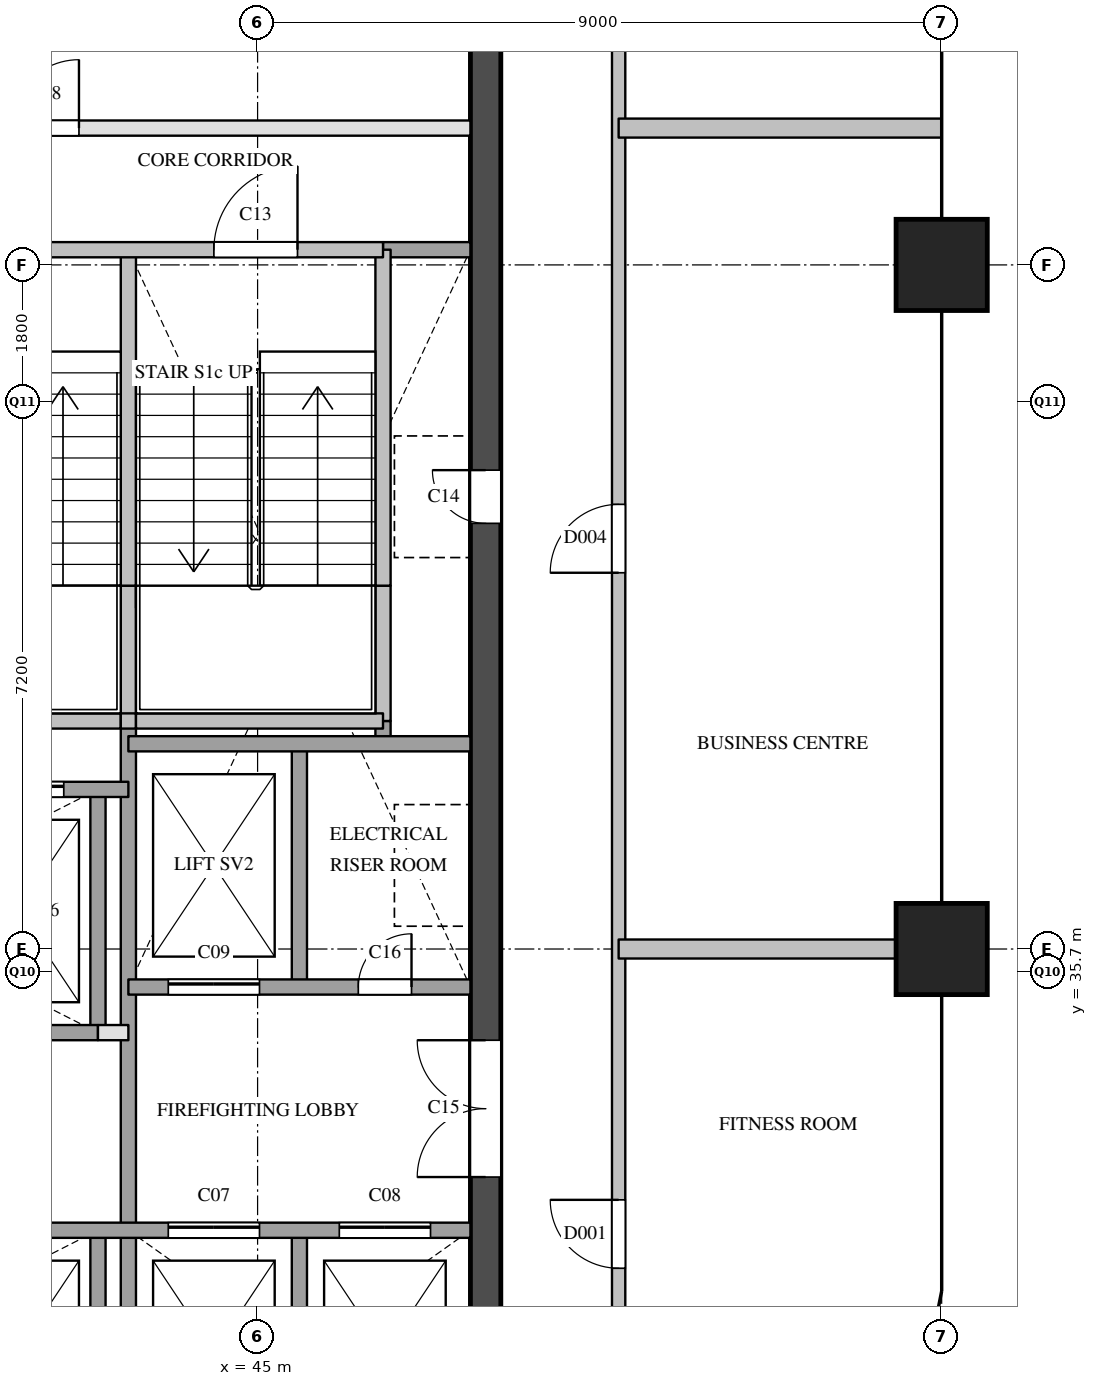
"""IFC4 building model, lengths in metres.
Left out: names, types, materials, properties, quantities, classifications, styles, units other than length and angle.
Written with IfcOpenShell. Run it as: python <this file> out.ifc"""

import sys

from ifc_helpers import new_model, si_unit, direction, frame, frame_2d, origin, origin_2d, place, context, subcontext, project, spatial, rectangle, extrude, element, fill, save


model = new_model("IFC4")
c1 = context("Model", 3, precision=1e-05, world=origin(), true_north=direction((0.0, 1.0)))
c2 = subcontext(c1, "Body", "Model", "MODEL_VIEW")
j1 = project(units=[si_unit("LENGTHUNIT", "METRE"), si_unit("PLANEANGLEUNIT", "RADIAN")], contexts=[c1])
p1 = place(None, origin())
s1 = spatial("IfcSite", under=j1, at=p1, CompositionType="ELEMENT")
p2 = place(p1, origin())
s2 = spatial("IfcBuilding", under=s1, at=p2, CompositionType="ELEMENT")
p3 = place(p2, frame((0.0, 0.0, 281.3)))
s3 = spatial("IfcBuildingStorey", under=s2, at=p3, CompositionType="ELEMENT", Elevation=281.3)
for number, where, z_axis, x_axis in (
    (1, (54.0, 36.0, 0.0), (0.0, 0.0, 1.0), (1.0, 0.0, 0.0)),
    (2, (54.0, 45.0, 0.0), (0.0, 0.0, 1.0), (1.0, 0.0, 0.0)),
):
    element("IfcColumn", number, at=place(p3, frame(where, z_axis=z_axis, x_axis=x_axis)), inside=s3, PredefinedType="COLUMN", context=c2, shape_type="SweptSolid", body=[
        extrude(rectangle(XDim=1.2, YDim=1.2, at=origin_2d()), origin(), (0.0, 0.0, 1.0), 3.9),
    ])
p4 = place(p3, frame((48.0, 29.1, 0.0), z_axis=(0.0, 0.0, 1.0), x_axis=(0.0, 1.0, 0.0)))
e3 = element("IfcWall", 3, at=p4, inside=s3, PredefinedType="SHEAR", context=c2, shape_type="SweptSolid", body=[
    extrude(rectangle(XDim=20.3, YDim=0.4, at=frame_2d((10.15, 0.0))), origin(), (0.0, 0.0, 1.0), 3.6),
])
p5 = place(p4, frame((12.5, 0.0, 0.0)))
e4 = element("IfcOpeningElement", 4, at=p5, cuts=e3, PredefinedType="OPENING", context=c2, shape_type="SweptSolid", body=[
    extrude(rectangle(XDim=0.7, YDim=2.1, at=frame_2d((0.35, 1.05))), frame((0.0, 0.21, 0.0), z_axis=(0.0, -1.0, 0.0), x_axis=(1.0, 0.0, 0.0)), (0.0, 0.0, 1.0), 0.42),
])
p6 = place(p4, frame((3.9, 0.0, 0.0)))
e5 = element("IfcOpeningElement", 5, at=p6, cuts=e3, PredefinedType="OPENING", context=c2, shape_type="SweptSolid", body=[
    extrude(rectangle(XDim=1.8, YDim=2.1, at=frame_2d((0.9, 1.05))), frame((0.0, 0.21, 0.0), z_axis=(0.0, -1.0, 0.0), x_axis=(1.0, 0.0, 0.0)), (0.0, 0.0, 1.0), 0.42),
])
p7 = place(p3, frame((42.9, 29.1, 0.0), z_axis=(0.0, 0.0, 1.0), x_axis=(0.0, 1.0, 0.0)))
e6 = element("IfcWall", 6, at=p7, inside=s3, PredefinedType="SOLIDWALL", context=c2, shape_type="SweptSolid", body=[
    extrude(rectangle(XDim=3.2, YDim=0.2, at=frame_2d((1.6, 0.0))), origin(), (0.0, 0.0, 1.0), 3.6),
])
p8 = place(p3, frame((42.9, 34.9, 0.0), z_axis=(0.0, 0.0, 1.0), x_axis=(0.0, 1.0, 0.0)))
e7 = element("IfcWall", 7, at=p8, inside=s3, PredefinedType="SOLIDWALL", context=c2, shape_type="SweptSolid", body=[
    extrude(rectangle(XDim=3.2, YDim=0.2, at=frame_2d((1.6, 0.0))), origin(), (0.0, 0.0, 1.0), 3.6),
])
p9 = place(p3, frame((43.3, 29.1, 0.0), z_axis=(0.0, 0.0, 1.0), x_axis=(0.0, 1.0, 0.0)))
e8 = element("IfcWall", 8, at=p9, inside=s3, PredefinedType="SOLIDWALL", context=c2, shape_type="SweptSolid", body=[
    extrude(rectangle(XDim=9.9, YDim=0.2, at=frame_2d((4.95, 0.0))), origin(), (0.0, 0.0, 1.0), 3.6),
])
p10 = place(p3, frame((43.3, 39.0, 0.0), z_axis=(0.0, 0.0, 1.0), x_axis=(0.0, 1.0, 0.0)))
e9 = element("IfcWall", 9, at=p10, inside=s3, PredefinedType="SOLIDWALL", context=c2, shape_type="SweptSolid", body=[
    extrude(rectangle(XDim=1.78, YDim=0.2, at=frame_2d((0.89, 0.0))), origin(), (0.0, 0.0, 1.0), 3.6),
])
p11 = place(p3, frame((43.3, 40.78, 0.0), z_axis=(0.0, 0.0, 1.0), x_axis=(0.0, 1.0, 0.0)))
e10 = element("IfcWall", 10, at=p11, inside=s3, PredefinedType="SOLIDWALL", context=c2, shape_type="SweptSolid", body=[
    extrude(rectangle(XDim=4.42, YDim=0.2, at=frame_2d((2.21, 0.0))), origin(), (0.0, 0.0, 1.0), 3.6),
])
for number, where, z_axis, x_axis in (
    (11, (45.55, 29.1, 0.0), (0.0, 0.0, 1.0), (0.0, 1.0, 0.0)),
    (12, (45.55, 35.5, 0.0), (0.0, 0.0, 1.0), (0.0, 1.0, 0.0)),
):
    element("IfcWall", number, at=place(p3, frame(where, z_axis=z_axis, x_axis=x_axis)), inside=s3, PredefinedType="SOLIDWALL", context=c2, shape_type="SweptSolid", body=[
        extrude(rectangle(XDim=3.2, YDim=0.2, at=frame_2d((1.6, 0.0))), origin(), (0.0, 0.0, 1.0), 3.6),
    ])
p12 = place(p3, frame((46.65, 38.7, 0.0), z_axis=(0.0, 0.0, 1.0), x_axis=(0.0, 1.0, 0.0)))
e13 = element("IfcWall", 13, at=p12, inside=s3, PredefinedType="SOLIDWALL", context=c2, shape_type="SweptSolid", body=[
    extrude(rectangle(XDim=0.3, YDim=0.2, at=frame_2d((0.15, 0.0))), origin(), (0.0, 0.0, 1.0), 3.6),
])
p13 = place(p3, frame((46.65, 39.0, 0.0), z_axis=(0.0, 0.0, 1.0), x_axis=(0.0, 1.0, 0.0)))
e14 = element("IfcWall", 14, at=p13, inside=s3, PredefinedType="SOLIDWALL", context=c2, shape_type="SweptSolid", body=[
    extrude(rectangle(XDim=1.78, YDim=0.2, at=frame_2d((0.89, 0.0))), origin(), (0.0, 0.0, 1.0), 3.6),
])
p14 = place(p3, frame((46.65, 40.78, 0.0), z_axis=(0.0, 0.0, 1.0), x_axis=(0.0, 1.0, 0.0)))
e15 = element("IfcWall", 15, at=p14, inside=s3, PredefinedType="SOLIDWALL", context=c2, shape_type="SweptSolid", body=[
    extrude(rectangle(XDim=4.42, YDim=0.2, at=frame_2d((2.21, 0.0))), origin(), (0.0, 0.0, 1.0), 3.6),
])
p15 = place(p3, frame((36.6, 32.3, 0.0), z_axis=(0.0, 0.0, 1.0), x_axis=(1.0, 0.0, 0.0)))
e16 = element("IfcWall", 16, at=p15, inside=s3, PredefinedType="SOLIDWALL", context=c2, shape_type="SweptSolid", body=[
    extrude(rectangle(XDim=11.2, YDim=0.2, at=frame_2d((5.6, 0.0))), origin(), (0.0, 0.0, 1.0), 3.6),
])
p16 = place(p15, frame((7.225, 0.0, 0.0)))
e17 = element("IfcOpeningElement", 17, at=p16, cuts=e16, PredefinedType="OPENING", context=c2, shape_type="SweptSolid", body=[
    extrude(rectangle(XDim=1.2, YDim=2.1, at=frame_2d((0.6, 1.05))), frame((0.0, 0.11, 0.0), z_axis=(0.0, -1.0, 0.0), x_axis=(1.0, 0.0, 0.0)), (0.0, 0.0, 1.0), 0.22),
])
p17 = place(p15, frame((9.475, 0.0, 0.0)))
e18 = element("IfcOpeningElement", 18, at=p17, cuts=e16, PredefinedType="OPENING", context=c2, shape_type="SweptSolid", body=[
    extrude(rectangle(XDim=1.2, YDim=2.1, at=frame_2d((0.6, 1.05))), frame((0.0, 0.11, 0.0), z_axis=(0.0, -1.0, 0.0), x_axis=(1.0, 0.0, 0.0)), (0.0, 0.0, 1.0), 0.22),
])
p18 = place(p3, frame((42.9, 34.9, 0.0), z_axis=(0.0, 0.0, 1.0), x_axis=(1.0, 0.0, 0.0)))
e19 = element("IfcWall", 19, at=p18, inside=s3, PredefinedType="PARTITIONING", context=c2, shape_type="SweptSolid", body=[
    extrude(rectangle(XDim=0.4, YDim=0.2, at=frame_2d((0.2, 0.0))), origin(), (0.0, 0.0, 1.0), 3.6),
])
p19 = place(p3, frame((36.6, 34.9, 0.0), z_axis=(0.0, 0.0, 1.0), x_axis=(1.0, 0.0, 0.0)))
e20 = element("IfcWall", 20, at=p19, inside=s3, PredefinedType="SOLIDWALL", context=c2, shape_type="SweptSolid", body=[
    extrude(rectangle(XDim=6.3, YDim=0.2, at=frame_2d((3.15, 0.0))), origin(), (0.0, 0.0, 1.0), 3.6),
])
p20 = place(p3, frame((43.3, 35.5, 0.0), z_axis=(0.0, 0.0, 1.0), x_axis=(1.0, 0.0, 0.0)))
e21 = element("IfcWall", 21, at=p20, inside=s3, PredefinedType="SOLIDWALL", context=c2, shape_type="SweptSolid", body=[
    extrude(rectangle(XDim=4.5, YDim=0.2, at=frame_2d((2.25, 0.0))), origin(), (0.0, 0.0, 1.0), 3.6),
])
p21 = place(p20, frame((0.525, 0.0, 0.0)))
e22 = element("IfcOpeningElement", 22, at=p21, cuts=e21, PredefinedType="OPENING", context=c2, shape_type="SweptSolid", body=[
    extrude(rectangle(XDim=1.2, YDim=2.1, at=frame_2d((0.6, 1.05))), frame((0.0, 0.11, 0.0), z_axis=(0.0, -1.0, 0.0), x_axis=(1.0, 0.0, 0.0)), (0.0, 0.0, 1.0), 0.22),
])
p22 = place(p20, frame((3.025, 0.0, 0.0)))
e23 = element("IfcOpeningElement", 23, at=p22, cuts=e21, PredefinedType="OPENING", context=c2, shape_type="SweptSolid", body=[
    extrude(rectangle(XDim=0.7, YDim=2.1, at=frame_2d((0.35, 1.05))), frame((0.0, 0.11, 0.0), z_axis=(0.0, -1.0, 0.0), x_axis=(1.0, 0.0, 0.0)), (0.0, 0.0, 1.0), 0.22),
])
p23 = place(p3, frame((36.6, 38.1, 0.0), z_axis=(0.0, 0.0, 1.0), x_axis=(1.0, 0.0, 0.0)))
e24 = element("IfcWall", 24, at=p23, inside=s3, PredefinedType="SOLIDWALL", context=c2, shape_type="SweptSolid", body=[
    extrude(rectangle(XDim=6.7, YDim=0.2, at=frame_2d((3.35, 0.0))), origin(), (0.0, 0.0, 1.0), 3.6),
])
p24 = place(p23, frame((0.45, 0.0, 0.0)))
e25 = element("IfcOpeningElement", 25, at=p24, cuts=e24, PredefinedType="OPENING", context=c2, shape_type="SweptSolid", body=[
    extrude(rectangle(XDim=1.2, YDim=2.1, at=frame_2d((0.6, 1.05))), frame((0.0, 0.11, 0.0), z_axis=(0.0, -1.0, 0.0), x_axis=(1.0, 0.0, 0.0)), (0.0, 0.0, 1.0), 0.22),
])
p25 = place(p23, frame((2.55, 0.0, 0.0)))
e26 = element("IfcOpeningElement", 26, at=p25, cuts=e24, PredefinedType="OPENING", context=c2, shape_type="SweptSolid", body=[
    extrude(rectangle(XDim=1.2, YDim=2.1, at=frame_2d((0.6, 1.05))), frame((0.0, 0.11, 0.0), z_axis=(0.0, -1.0, 0.0), x_axis=(1.0, 0.0, 0.0)), (0.0, 0.0, 1.0), 0.22),
])
p26 = place(p23, frame((4.65, 0.0, 0.0)))
e27 = element("IfcOpeningElement", 27, at=p26, cuts=e24, PredefinedType="OPENING", context=c2, shape_type="SweptSolid", body=[
    extrude(rectangle(XDim=1.2, YDim=2.1, at=frame_2d((0.6, 1.05))), frame((0.0, 0.11, 0.0), z_axis=(0.0, -1.0, 0.0), x_axis=(1.0, 0.0, 0.0)), (0.0, 0.0, 1.0), 0.22),
])
p27 = place(p3, frame((43.3, 38.7, 0.0), z_axis=(0.0, 0.0, 1.0), x_axis=(1.0, 0.0, 0.0)))
e28 = element("IfcWall", 28, at=p27, inside=s3, PredefinedType="SOLIDWALL", context=c2, shape_type="SweptSolid", body=[
    extrude(rectangle(XDim=4.5, YDim=0.2, at=frame_2d((2.25, 0.0))), origin(), (0.0, 0.0, 1.0), 3.6),
])
p28 = place(p3, frame((40.05, 39.0, 0.0), z_axis=(0.0, 0.0, 1.0), x_axis=(1.0, 0.0, 0.0)))
e29 = element("IfcWall", 29, at=p28, inside=s3, PredefinedType="SOLIDWALL", context=c2, shape_type="SweptSolid", body=[
    extrude(rectangle(XDim=3.15, YDim=0.2, at=frame_2d((1.575, 0.0))), origin(), (0.0, 0.0, 1.0), 3.6),
])
p29 = place(p3, frame((43.2, 39.0, 0.0), z_axis=(0.0, 0.0, 1.0), x_axis=(1.0, 0.0, 0.0)))
e30 = element("IfcWall", 30, at=p29, inside=s3, PredefinedType="SOLIDWALL", context=c2, shape_type="SweptSolid", body=[
    extrude(rectangle(XDim=0.2, YDim=0.2, at=frame_2d((0.1, 0.0))), origin(), (0.0, 0.0, 1.0), 3.6),
])
p30 = place(p3, frame((43.4, 39.0, 0.0), z_axis=(0.0, 0.0, 1.0), x_axis=(1.0, 0.0, 0.0)))
e31 = element("IfcWall", 31, at=p30, inside=s3, PredefinedType="SOLIDWALL", context=c2, shape_type="SweptSolid", body=[
    extrude(rectangle(XDim=3.25, YDim=0.2, at=frame_2d((1.625, 0.0))), origin(), (0.0, 0.0, 1.0), 3.6),
])
p31 = place(p3, frame((46.65, 45.2, 0.0), z_axis=(0.0, 0.0, 1.0), x_axis=(1.0, 0.0, 0.0)))
e32 = element("IfcWall", 32, at=p31, inside=s3, PredefinedType="SOLIDWALL", context=c2, shape_type="SweptSolid", body=[
    extrude(rectangle(XDim=1.15, YDim=0.2, at=frame_2d((0.575, 0.0))), origin(), (0.0, 0.0, 1.0), 3.6),
])
p32 = place(p3, frame((36.6, 45.2, 0.0), z_axis=(0.0, 0.0, 1.0), x_axis=(1.0, 0.0, 0.0)))
e33 = element("IfcWall", 33, at=p32, inside=s3, PredefinedType="SOLIDWALL", context=c2, shape_type="SweptSolid", body=[
    extrude(rectangle(XDim=10.05, YDim=0.2, at=frame_2d((5.025, 0.0))), origin(), (0.0, 0.0, 1.0), 3.6),
])
p33 = place(p32, frame((1.125, 0.0, 0.0)))
e34 = element("IfcOpeningElement", 34, at=p33, cuts=e33, PredefinedType="OPENING", context=c2, shape_type="SweptSolid", body=[
    extrude(rectangle(XDim=1.1, YDim=2.1, at=frame_2d((0.55, 1.05))), frame((0.0, 0.11, 0.0), z_axis=(0.0, -1.0, 0.0), x_axis=(1.0, 0.0, 0.0)), (0.0, 0.0, 1.0), 0.22),
])
p34 = place(p32, frame((4.475, 0.0, 0.0)))
e35 = element("IfcOpeningElement", 35, at=p34, cuts=e33, PredefinedType="OPENING", context=c2, shape_type="SweptSolid", body=[
    extrude(rectangle(XDim=1.1, YDim=2.1, at=frame_2d((0.55, 1.05))), frame((0.0, 0.11, 0.0), z_axis=(0.0, -1.0, 0.0), x_axis=(1.0, 0.0, 0.0)), (0.0, 0.0, 1.0), 0.22),
])
p35 = place(p32, frame((7.825, 0.0, 0.0)))
e36 = element("IfcOpeningElement", 36, at=p35, cuts=e33, PredefinedType="OPENING", context=c2, shape_type="SweptSolid", body=[
    extrude(rectangle(XDim=1.1, YDim=2.1, at=frame_2d((0.55, 1.05))), frame((0.0, 0.11, 0.0), z_axis=(0.0, -1.0, 0.0), x_axis=(1.0, 0.0, 0.0)), (0.0, 0.0, 1.0), 0.22),
])
p36 = place(p3, frame((36.6, 46.8, 0.0), z_axis=(0.0, 0.0, 1.0), x_axis=(1.0, 0.0, 0.0)))
e37 = element("IfcWall", 37, at=p36, inside=s3, PredefinedType="PARTITIONING", context=c2, shape_type="SweptSolid", body=[
    extrude(rectangle(XDim=11.2, YDim=0.2, at=frame_2d((5.6, 0.0))), origin(), (0.0, 0.0, 1.0), 3.6),
])
p37 = place(p36, frame((5.15, 0.0, 0.0)))
e38 = element("IfcOpeningElement", 38, at=p37, cuts=e37, PredefinedType="OPENING", context=c2, shape_type="SweptSolid", body=[
    extrude(rectangle(XDim=0.9, YDim=2.1, at=frame_2d((0.45, 1.05))), frame((0.0, 0.11, 0.0), z_axis=(0.0, -1.0, 0.0), x_axis=(1.0, 0.0, 0.0)), (0.0, 0.0, 1.0), 0.22),
])
p38 = place(p3, frame((49.75, 28.5, 0.0), z_axis=(0.0, 0.0, 1.0), x_axis=(0.0, 1.0, 0.0)))
e39 = element("IfcWall", 39, at=p38, inside=s3, PredefinedType="PARTITIONING", context=c2, shape_type="SweptSolid", body=[
    extrude(rectangle(XDim=22.85, YDim=0.175, at=frame_2d((11.425, 0.0))), origin(), (0.0, 0.0, 1.0), 3.6),
])
p39 = place(p38, frame((3.3, 0.0, 0.0)))
e40 = element("IfcOpeningElement", 40, at=p39, cuts=e39, PredefinedType="OPENING", context=c2, shape_type="SweptSolid", body=[
    extrude(rectangle(XDim=0.9, YDim=2.1, at=frame_2d((0.45, 1.05))), frame((0.0, 0.097, 0.0), z_axis=(0.0, -1.0, 0.0), x_axis=(1.0, 0.0, 0.0)), (0.0, 0.0, 1.0), 0.195),
])
p40 = place(p38, frame((12.45, 0.0, 0.0)))
e41 = element("IfcOpeningElement", 41, at=p40, cuts=e39, PredefinedType="OPENING", context=c2, shape_type="SweptSolid", body=[
    extrude(rectangle(XDim=0.9, YDim=2.1, at=frame_2d((0.45, 1.05))), frame((0.0, 0.097, 0.0), z_axis=(0.0, -1.0, 0.0), x_axis=(1.0, 0.0, 0.0)), (0.0, 0.0, 1.0), 0.195),
])
p41 = place(p38, frame((20.125, 0.0, 0.0)))
e42 = element("IfcOpeningElement", 42, at=p41, cuts=e39, PredefinedType="OPENING", context=c2, shape_type="SweptSolid", body=[
    extrude(rectangle(XDim=0.9, YDim=2.1, at=frame_2d((0.45, 1.05))), frame((0.0, 0.097, 0.0), z_axis=(0.0, -1.0, 0.0), x_axis=(1.0, 0.0, 0.0)), (0.0, 0.0, 1.0), 0.195),
])
p42 = place(p3, frame((49.75, 36.0, 0.0), z_axis=(0.0, 0.0, 1.0), x_axis=(1.0, 0.0, 0.0)))
e43 = element("IfcWall", 43, at=p42, inside=s3, PredefinedType="PARTITIONING", context=c2, shape_type="SweptSolid", body=[
    extrude(rectangle(XDim=4.25, YDim=0.25, at=frame_2d((2.125, 0.0))), origin(), (0.0, 0.0, 1.0), 3.6),
])
p43 = place(p3, frame((49.75, 46.8, 0.0), z_axis=(0.0, 0.0, 1.0), x_axis=(1.0, 0.0, 0.0)))
e44 = element("IfcWall", 44, at=p43, inside=s3, PredefinedType="PARTITIONING", context=c2, shape_type="SweptSolid", body=[
    extrude(rectangle(XDim=4.25, YDim=0.25, at=frame_2d((2.125, 0.0))), origin(), (0.0, 0.0, 1.0), 2.6),
])
p44 = place(p26, origin())
e45 = element("IfcDoor", 45, at=p44, inside=s3, OperationType="SLIDING_TO_LEFT", PredefinedType="DOOR", context=c2, shape_type="SweptSolid", body=[
    extrude(rectangle(XDim=1.2, YDim=2.1, at=frame_2d((0.6, 1.05))), frame((0.0, 0.025, 0.0), z_axis=(0.0, -1.0, 0.0), x_axis=(1.0, 0.0, 0.0)), (0.0, 0.0, 1.0), 0.05),
])
fill(e27, e45)
p45 = place(p16, origin())
e46 = element("IfcDoor", 46, at=p45, inside=s3, OperationType="SLIDING_TO_LEFT", PredefinedType="DOOR", context=c2, shape_type="SweptSolid", body=[
    extrude(rectangle(XDim=1.2, YDim=2.1, at=frame_2d((0.6, 1.05))), frame((0.0, 0.025, 0.0), z_axis=(0.0, -1.0, 0.0), x_axis=(1.0, 0.0, 0.0)), (0.0, 0.0, 1.0), 0.05),
])
fill(e17, e46)
p46 = place(p17, origin())
e47 = element("IfcDoor", 47, at=p46, inside=s3, OperationType="SLIDING_TO_LEFT", PredefinedType="DOOR", context=c2, shape_type="SweptSolid", body=[
    extrude(rectangle(XDim=1.2, YDim=2.1, at=frame_2d((0.6, 1.05))), frame((0.0, 0.025, 0.0), z_axis=(0.0, -1.0, 0.0), x_axis=(1.0, 0.0, 0.0)), (0.0, 0.0, 1.0), 0.05),
])
fill(e18, e47)
p47 = place(p21, origin())
e48 = element("IfcDoor", 48, at=p47, inside=s3, OperationType="SLIDING_TO_LEFT", PredefinedType="DOOR", context=c2, shape_type="SweptSolid", body=[
    extrude(rectangle(XDim=1.2, YDim=2.1, at=frame_2d((0.6, 1.05))), frame((0.0, 0.025, 0.0), z_axis=(0.0, -1.0, 0.0), x_axis=(1.0, 0.0, 0.0)), (0.0, 0.0, 1.0), 0.05),
])
fill(e22, e48)
p48 = place(p35, origin())
e49 = element("IfcDoor", 49, at=p48, inside=s3, OperationType="SINGLE_SWING_RIGHT", PredefinedType="DOOR", context=c2, shape_type="SweptSolid", body=[
    extrude(rectangle(XDim=1.1, YDim=2.1, at=frame_2d((0.55, 1.05))), frame((0.0, 0.025, 0.0), z_axis=(0.0, -1.0, 0.0), x_axis=(1.0, 0.0, 0.0)), (0.0, 0.0, 1.0), 0.05),
])
fill(e36, e49)
p49 = place(p5, origin())
e50 = element("IfcDoor", 50, at=p49, inside=s3, OperationType="SINGLE_SWING_RIGHT", PredefinedType="DOOR", context=c2, shape_type="SweptSolid", body=[
    extrude(rectangle(XDim=0.7, YDim=2.1, at=frame_2d((0.35, 1.05))), frame((0.0, 0.025, 0.0), z_axis=(0.0, -1.0, 0.0), x_axis=(1.0, 0.0, 0.0)), (0.0, 0.0, 1.0), 0.05),
])
fill(e4, e50)
p50 = place(p6, origin())
e51 = element("IfcDoor", 51, at=p50, inside=s3, OperationType="DOUBLE_DOOR_SINGLE_SWING", PredefinedType="DOOR", context=c2, shape_type="SweptSolid", body=[
    extrude(rectangle(XDim=1.8, YDim=2.1, at=frame_2d((0.9, 1.05))), frame((0.0, 0.025, 0.0), z_axis=(0.0, -1.0, 0.0), x_axis=(1.0, 0.0, 0.0)), (0.0, 0.0, 1.0), 0.05),
])
fill(e5, e51)
p51 = place(p22, origin())
e52 = element("IfcDoor", 52, at=p51, inside=s3, OperationType="SINGLE_SWING_RIGHT", PredefinedType="DOOR", context=c2, shape_type="SweptSolid", body=[
    extrude(rectangle(XDim=0.7, YDim=2.1, at=frame_2d((0.35, 1.05))), frame((0.0, 0.025, 0.0), z_axis=(0.0, -1.0, 0.0), x_axis=(1.0, 0.0, 0.0)), (0.0, 0.0, 1.0), 0.05),
])
fill(e23, e52)
p52 = place(p37, origin())
e53 = element("IfcDoor", 53, at=p52, inside=s3, OperationType="SINGLE_SWING_RIGHT", PredefinedType="DOOR", context=c2, shape_type="SweptSolid", body=[
    extrude(rectangle(XDim=0.9, YDim=2.1, at=frame_2d((0.45, 1.05))), frame((0.0, 0.025, 0.0), z_axis=(0.0, -1.0, 0.0), x_axis=(1.0, 0.0, 0.0)), (0.0, 0.0, 1.0), 0.05),
])
fill(e38, e53)
p53 = place(p39, origin())
e54 = element("IfcDoor", 54, at=p53, inside=s3, OperationType="SINGLE_SWING_RIGHT", PredefinedType="DOOR", context=c2, shape_type="SweptSolid", body=[
    extrude(rectangle(XDim=0.9, YDim=2.1, at=frame_2d((0.45, 1.05))), frame((0.0, 0.025, 0.0), z_axis=(0.0, -1.0, 0.0), x_axis=(1.0, 0.0, 0.0)), (0.0, 0.0, 1.0), 0.05),
])
fill(e40, e54)
p54 = place(p40, origin())
e55 = element("IfcDoor", 55, at=p54, inside=s3, OperationType="SINGLE_SWING_LEFT", PredefinedType="DOOR", context=c2, shape_type="SweptSolid", body=[
    extrude(rectangle(XDim=0.9, YDim=2.1, at=frame_2d((0.45, 1.05))), frame((0.0, 0.025, 0.0), z_axis=(0.0, -1.0, 0.0), x_axis=(1.0, 0.0, 0.0)), (0.0, 0.0, 1.0), 0.05),
])
fill(e41, e55)
save(model, sys.argv[1])
